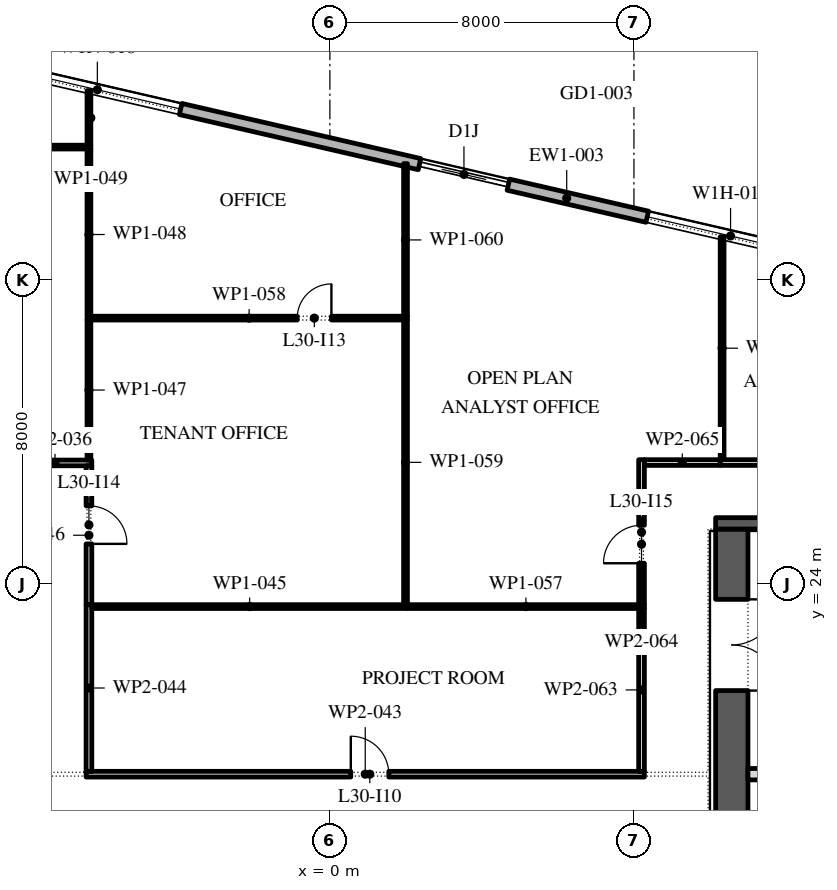
"""IFC4 building model, lengths in metres.
Left out: names, types, materials, properties, quantities, classifications, styles, units other than length and angle.
Written with IfcOpenShell. Run it as: python <this file> out.ifc"""

import sys

from ifc_helpers import new_model, si_unit, direction, frame, frame_2d, origin, place, context, subcontext, project, spatial, rectangle, extrude, element, fill, save


model = new_model("IFC4")
c1 = context("Model", 3, precision=1e-05, world=origin(), true_north=direction((0.0, 1.0)))
c2 = subcontext(c1, "Body", "Model", "MODEL_VIEW")
j1 = project(units=[si_unit("LENGTHUNIT", "METRE"), si_unit("PLANEANGLEUNIT", "RADIAN")], contexts=[c1])
p1 = place(None, origin())
s1 = spatial("IfcSite", under=j1, at=p1, CompositionType="ELEMENT")
p2 = place(p1, origin())
s2 = spatial("IfcBuilding", under=s1, at=p2, CompositionType="ELEMENT")
p3 = place(p2, frame((0.0, 0.0, 139.2)))
s3 = spatial("IfcBuildingStorey", under=s2, at=p3, CompositionType="ELEMENT", Elevation=139.2)
p4 = place(p3, frame((31.078, 28.421, 0.0), z_axis=(0.0, 0.0, 1.0), x_axis=(-0.974370456532, 0.224949357493, 0.0)))
e1 = element("IfcWall", 1, at=p4, inside=s3, PredefinedType="STANDARD", context=c2, shape_type="SweptSolid", body=[
    extrude(rectangle(XDim=51.0, YDim=0.3, at=frame_2d((25.5, 0.0))), origin(), (0.0, 0.0, 1.0), 4.0),
])
p5 = place(p4, frame((1.875, 0.0, 0.45)))
e2 = element("IfcOpeningElement", 2, at=p5, cuts=e1, PredefinedType="OPENING", context=c2, shape_type="SweptSolid", body=[
    extrude(rectangle(XDim=4.5, YDim=2.875, at=frame_2d((2.25, 1.438))), frame((0.0, 0.16, 0.0), z_axis=(0.0, -1.0, 0.0), x_axis=(1.0, 0.0, 0.0)), (0.0, 0.0, 1.0), 0.32),
])
p6 = place(p4, frame((10.275, 0.0, 0.45)))
e3 = element("IfcOpeningElement", 3, at=p6, cuts=e1, PredefinedType="OPENING", context=c2, shape_type="SweptSolid", body=[
    extrude(rectangle(XDim=4.5, YDim=2.825, at=frame_2d((2.25, 1.413))), frame((0.0, 0.16, 0.0), z_axis=(0.0, -1.0, 0.0), x_axis=(1.0, 0.0, 0.0)), (0.0, 0.0, 1.0), 0.32),
])
p7 = place(p4, frame((18.825, 0.0, 0.45)))
e4 = element("IfcOpeningElement", 4, at=p7, cuts=e1, PredefinedType="OPENING", context=c2, shape_type="SweptSolid", body=[
    extrude(rectangle(XDim=4.5, YDim=2.75, at=frame_2d((2.25, 1.375))), frame((0.0, 0.16, 0.0), z_axis=(0.0, -1.0, 0.0), x_axis=(1.0, 0.0, 0.0)), (0.0, 0.0, 1.0), 0.32),
])
p8 = place(p4, frame((27.075, 0.0, 0.0)))
e5 = element("IfcOpeningElement", 5, at=p8, cuts=e1, PredefinedType="OPENING", context=c2, shape_type="SweptSolid", body=[
    extrude(rectangle(XDim=2.4, YDim=3.125, at=frame_2d((1.2, 1.562))), frame((0.0, 0.16, 0.0), z_axis=(0.0, -1.0, 0.0), x_axis=(1.0, 0.0, 0.0)), (0.0, 0.0, 1.0), 0.32),
])
p9 = place(p4, frame((35.925, 0.0, 0.45)))
e6 = element("IfcOpeningElement", 6, at=p9, cuts=e1, PredefinedType="OPENING", context=c2, shape_type="SweptSolid", body=[
    extrude(rectangle(XDim=4.5, YDim=2.525, at=frame_2d((2.25, 1.262))), frame((0.0, 0.16, 0.0), z_axis=(0.0, -1.0, 0.0), x_axis=(1.0, 0.0, 0.0)), (0.0, 0.0, 1.0), 0.32),
])
p10 = place(p4, frame((44.475, 0.0, 0.45)))
e7 = element("IfcOpeningElement", 7, at=p10, cuts=e1, PredefinedType="OPENING", context=c2, shape_type="SweptSolid", body=[
    extrude(rectangle(XDim=4.5, YDim=2.45, at=frame_2d((2.25, 1.225))), frame((0.0, 0.16, 0.0), z_axis=(0.0, -1.0, 0.0), x_axis=(1.0, 0.0, 0.0)), (0.0, 0.0, 1.0), 0.32),
])
p11 = place(p3, frame((10.575, -2.45, 0.0), z_axis=(0.0, 0.0, 1.0), x_axis=(0.0, 1.0, 0.0)))
e8 = element("IfcWall", 8, at=p11, inside=s3, PredefinedType="SHEAR", context=c2, shape_type="SweptSolid", body=[
    extrude(rectangle(XDim=27.9, YDim=0.85, at=frame_2d((13.95, 0.0))), origin(), (0.0, 0.0, 1.0), 4.0),
])
p12 = place(p11, frame((23.65, 0.0, 0.0)))
e9 = element("IfcOpeningElement", 9, at=p12, cuts=e8, PredefinedType="OPENING", context=c2, shape_type="SweptSolid", body=[
    extrude(rectangle(XDim=2.4, YDim=2.1, at=frame_2d((1.2, 1.05))), frame((0.0, 0.435, 0.0), z_axis=(0.0, -1.0, 0.0), x_axis=(1.0, 0.0, 0.0)), (0.0, 0.0, 1.0), 0.87),
])
p13 = place(p11, frame((1.387, 0.0, 0.0)))
e10 = element("IfcOpeningElement", 10, at=p13, cuts=e8, PredefinedType="OPENING", context=c2, shape_type="SweptSolid", body=[
    extrude(rectangle(XDim=0.9, YDim=2.1, at=frame_2d((0.45, 1.05))), frame((0.0, 0.435, 0.0), z_axis=(0.0, -1.0, 0.0), x_axis=(1.0, 0.0, 0.0)), (0.0, 0.0, 1.0), 0.87),
])
p14 = place(p11, frame((4.562, 0.0, 0.0)))
e11 = element("IfcOpeningElement", 11, at=p14, cuts=e8, PredefinedType="OPENING", context=c2, shape_type="SweptSolid", body=[
    extrude(rectangle(XDim=1.0, YDim=2.1, at=frame_2d((0.5, 1.05))), frame((0.0, 0.435, 0.0), z_axis=(0.0, -1.0, 0.0), x_axis=(1.0, 0.0, 0.0)), (0.0, 0.0, 1.0), 0.87),
])
p15 = place(p3, frame((10.15, 25.6, 0.0), z_axis=(0.0, 0.0, 1.0), x_axis=(1.0, 0.0, 0.0)))
e12 = element("IfcWall", 12, at=p15, inside=s3, PredefinedType="SHEAR", context=c2, shape_type="SweptSolid", body=[
    extrude(rectangle(XDim=11.7, YDim=0.3, at=frame_2d((5.85, 0.0))), origin(), (0.0, 0.0, 1.0), 4.0),
])
p16 = place(p3, frame((11.0, 19.0, 0.0), z_axis=(0.0, 0.0, 1.0), x_axis=(1.0, 0.0, 0.0)))
e13 = element("IfcWall", 13, at=p16, inside=s3, PredefinedType="PARTITIONING", context=c2, shape_type="SweptSolid", body=[
    extrude(rectangle(XDim=3.0, YDim=0.3, at=frame_2d((1.5, 0.0))), origin(), (0.0, 0.0, 1.0), 4.0),
])
p17 = place(p3, frame((-14.62, 35.5, 0.0), z_axis=(0.0, 0.0, 1.0), x_axis=(1.0, 0.0, 0.0)))
e14 = element("IfcWall", 14, at=p17, inside=s3, PredefinedType="PARTITIONING", context=c2, shape_type="SweptSolid", body=[
    extrude(rectangle(XDim=8.33, YDim=0.1, at=frame_2d((4.165, 0.0))), origin(), (0.0, 0.0, 1.0), 4.0),
])
p18 = place(p17, frame((5.43, 0.0, 0.0)))
e15 = element("IfcOpeningElement", 15, at=p18, cuts=e14, PredefinedType="OPENING", context=c2, shape_type="SweptSolid", body=[
    extrude(rectangle(XDim=0.9, YDim=2.1, at=frame_2d((0.45, 1.05))), frame((0.0, 0.06, 0.0), z_axis=(0.0, -1.0, 0.0), x_axis=(1.0, 0.0, 0.0)), (0.0, 0.0, 1.0), 0.12),
])
p19 = place(p3, frame((-8.2, 27.19, 0.0), z_axis=(0.0, 0.0, 1.0), x_axis=(1.0, 0.0, 0.0)))
e16 = element("IfcWall", 16, at=p19, inside=s3, PredefinedType="PARTITIONING", context=c2, shape_type="SweptSolid", body=[
    extrude(rectangle(XDim=1.935, YDim=0.15, at=frame_2d((0.968, 0.0))), origin(), (0.0, 0.0, 1.0), 4.0),
])
p20 = place(p3, frame((-6.415, 19.0, 0.0), z_axis=(0.0, 0.0, 1.0), x_axis=(1.0, 0.0, 0.0)))
e17 = element("IfcWall", 17, at=p20, inside=s3, PredefinedType="PARTITIONING", context=c2, shape_type="SweptSolid", body=[
    extrude(rectangle(XDim=14.69, YDim=0.15, at=frame_2d((7.345, 0.0))), origin(), (0.0, 0.0, 1.0), 4.0),
])
p21 = place(p20, frame((6.965, 0.0, 0.0)))
e18 = element("IfcOpeningElement", 18, at=p21, cuts=e17, PredefinedType="OPENING", context=c2, shape_type="SweptSolid", body=[
    extrude(rectangle(XDim=1.0, YDim=2.1, at=frame_2d((0.5, 1.05))), frame((0.0, 0.085, 0.0), z_axis=(0.0, -1.0, 0.0), x_axis=(1.0, 0.0, 0.0)), (0.0, 0.0, 1.0), 0.17),
])
p22 = place(p3, frame((-6.34, 23.46, 0.0), z_axis=(0.0, 0.0, 1.0), x_axis=(0.0, -1.0, 0.0)))
e19 = element("IfcWall", 19, at=p22, inside=s3, PredefinedType="PARTITIONING", context=c2, shape_type="SweptSolid", body=[
    extrude(rectangle(XDim=4.385, YDim=0.15, at=frame_2d((2.192, 0.0))), origin(), (0.0, 0.0, 1.0), 4.0),
])
p23 = place(p3, frame((-6.265, 23.41, 0.0), z_axis=(0.0, 0.0, 1.0), x_axis=(1.0, 0.0, 0.0)))
e20 = element("IfcWall", 20, at=p23, inside=s3, PredefinedType="PARTITIONING", context=c2, shape_type="SweptSolid", body=[
    extrude(rectangle(XDim=8.305, YDim=0.1, at=frame_2d((4.152, 0.0))), origin(), (0.0, 0.0, 1.0), 4.0),
])
p24 = place(p3, frame((-6.34, 27.115, 0.0), z_axis=(0.0, 0.0, 1.0), x_axis=(0.0, -1.0, 0.0)))
e21 = element("IfcWall", 21, at=p24, inside=s3, PredefinedType="PARTITIONING", context=c2, shape_type="SweptSolid", body=[
    extrude(rectangle(XDim=3.655, YDim=0.15, at=frame_2d((1.828, 0.0))), origin(), (0.0, 0.0, 1.0), 4.0),
])
p25 = place(p24, frame((1.055, 0.0, 0.0)))
e22 = element("IfcOpeningElement", 22, at=p25, cuts=e21, PredefinedType="OPENING", context=c2, shape_type="SweptSolid", body=[
    extrude(rectangle(XDim=1.0, YDim=2.1, at=frame_2d((0.5, 1.05))), frame((0.0, 0.085, 0.0), z_axis=(0.0, -1.0, 0.0), x_axis=(1.0, 0.0, 0.0)), (0.0, 0.0, 1.0), 0.17),
])
p26 = place(p3, frame((-6.34, 27.265, 0.0), z_axis=(0.0, 0.0, 1.0), x_axis=(0.0, 1.0, 0.0)))
e23 = element("IfcWall", 23, at=p26, inside=s3, PredefinedType="PARTITIONING", context=c2, shape_type="SweptSolid", body=[
    extrude(rectangle(XDim=3.685, YDim=0.1, at=frame_2d((1.843, 0.0))), origin(), (0.0, 0.0, 1.0), 4.0),
])
p27 = place(p3, frame((-6.34, 30.95, 0.0), z_axis=(0.0, 0.0, 1.0), x_axis=(0.0, 1.0, 0.0)))
e24 = element("IfcWall", 24, at=p27, inside=s3, PredefinedType="PARTITIONING", context=c2, shape_type="SweptSolid", body=[
    extrude(rectangle(XDim=4.5, YDim=0.1, at=frame_2d((2.25, 0.0))), origin(), (0.0, 0.0, 1.0), 4.0),
])
p28 = place(p3, frame((-6.34, 35.55, 0.0), z_axis=(0.0, 0.0, 1.0), x_axis=(0.0, 1.0, 0.0)))
e25 = element("IfcWall", 25, at=p28, inside=s3, PredefinedType="PARTITIONING", context=c2, shape_type="SweptSolid", body=[
    extrude(rectangle(XDim=1.438, YDim=0.1, at=frame_2d((0.719, 0.0))), origin(), (0.0, 0.0, 1.0), 4.0),
])
p29 = place(p3, frame((2.04, 23.41, 0.0), z_axis=(0.0, 0.0, 1.0), x_axis=(1.0, 0.0, 0.0)))
e26 = element("IfcWall", 26, at=p29, inside=s3, PredefinedType="PARTITIONING", context=c2, shape_type="SweptSolid", body=[
    extrude(rectangle(XDim=6.235, YDim=0.1, at=frame_2d((3.117, 0.0))), origin(), (0.0, 0.0, 1.0), 4.0),
])
p30 = place(p3, frame((2.04, 31.0, 0.0), z_axis=(0.0, 0.0, 1.0), x_axis=(-1.0, 0.0, 0.0)))
e27 = element("IfcWall", 27, at=p30, inside=s3, PredefinedType="PARTITIONING", context=c2, shape_type="SweptSolid", body=[
    extrude(rectangle(XDim=8.33, YDim=0.1, at=frame_2d((4.165, 0.0))), origin(), (0.0, 0.0, 1.0), 4.0),
])
p31 = place(p30, frame((2.0, 0.0, 0.0)))
e28 = element("IfcOpeningElement", 28, at=p31, cuts=e27, PredefinedType="OPENING", context=c2, shape_type="SweptSolid", body=[
    extrude(rectangle(XDim=0.9, YDim=2.1, at=frame_2d((0.45, 1.05))), frame((0.0, 0.06, 0.0), z_axis=(0.0, -1.0, 0.0), x_axis=(1.0, 0.0, 0.0)), (0.0, 0.0, 1.0), 0.12),
])
p32 = place(p3, frame((1.99, 30.95, 0.0), z_axis=(0.0, 0.0, 1.0), x_axis=(0.0, -1.0, 0.0)))
e29 = element("IfcWall", 29, at=p32, inside=s3, PredefinedType="PARTITIONING", context=c2, shape_type="SweptSolid", body=[
    extrude(rectangle(XDim=7.49, YDim=0.1, at=frame_2d((3.745, 0.0))), origin(), (0.0, 0.0, 1.0), 4.0),
])
p33 = place(p3, frame((1.99, 35.065, 0.0), z_axis=(0.0, 0.0, 1.0), x_axis=(0.0, -1.0, 0.0)))
e30 = element("IfcWall", 30, at=p33, inside=s3, PredefinedType="PARTITIONING", context=c2, shape_type="SweptSolid", body=[
    extrude(rectangle(XDim=4.015, YDim=0.1, at=frame_2d((2.007, 0.0))), origin(), (0.0, 0.0, 1.0), 4.0),
])
p34 = place(p3, frame((8.2, 19.075, 0.0), z_axis=(0.0, 0.0, 1.0), x_axis=(0.0, 1.0, 0.0)))
e31 = element("IfcWall", 31, at=p34, inside=s3, PredefinedType="PARTITIONING", context=c2, shape_type="SweptSolid", body=[
    extrude(rectangle(XDim=4.285, YDim=0.15, at=frame_2d((2.143, 0.0))), origin(), (0.0, 0.0, 1.0), 4.0),
])
p35 = place(p3, frame((8.2, 23.46, 0.0), z_axis=(0.0, 0.0, 1.0), x_axis=(0.0, 1.0, 0.0)))
e32 = element("IfcWall", 32, at=p35, inside=s3, PredefinedType="PARTITIONING", context=c2, shape_type="SweptSolid", body=[
    extrude(rectangle(XDim=3.815, YDim=0.15, at=frame_2d((1.907, 0.0))), origin(), (0.0, 0.0, 1.0), 4.0),
])
p36 = place(p35, frame((1.09, 0.0, 0.0)))
e33 = element("IfcOpeningElement", 33, at=p36, cuts=e32, PredefinedType="OPENING", context=c2, shape_type="SweptSolid", body=[
    extrude(rectangle(XDim=1.0, YDim=2.1, at=frame_2d((0.5, 1.05))), frame((0.0, 0.085, 0.0), z_axis=(0.0, -1.0, 0.0), x_axis=(1.0, 0.0, 0.0)), (0.0, 0.0, 1.0), 0.17),
])
p37 = place(p3, frame((8.275, 27.2, 0.0), z_axis=(0.0, 0.0, 1.0), x_axis=(1.0, 0.0, 0.0)))
e34 = element("IfcWall", 34, at=p37, inside=s3, PredefinedType="PARTITIONING", context=c2, shape_type="SweptSolid", body=[
    extrude(rectangle(XDim=1.995, YDim=0.15, at=frame_2d((0.998, 0.0))), origin(), (0.0, 0.0, 1.0), 4.0),
])
p38 = place(p3, frame((10.27, 27.2, 0.0), z_axis=(0.0, 0.0, 1.0), x_axis=(1.0, 0.0, 0.0)))
e35 = element("IfcWall", 35, at=p38, inside=s3, PredefinedType="PARTITIONING", context=c2, shape_type="SweptSolid", body=[
    extrude(rectangle(XDim=12.79, YDim=0.15, at=frame_2d((6.395, 0.0))), origin(), (0.0, 0.0, 1.0), 4.0),
])
p39 = place(p38, frame((7.09, 0.0, 0.0)))
e36 = element("IfcOpeningElement", 36, at=p39, cuts=e35, PredefinedType="OPENING", context=c2, shape_type="SweptSolid", body=[
    extrude(rectangle(XDim=1.0, YDim=2.1, at=frame_2d((0.5, 1.05))), frame((0.0, 0.085, 0.0), z_axis=(0.0, -1.0, 0.0), x_axis=(1.0, 0.0, 0.0)), (0.0, 0.0, 1.0), 0.17),
])
p40 = place(p3, frame((10.32, 33.142, 0.0), z_axis=(0.0, 0.0, 1.0), x_axis=(0.0, -1.0, 0.0)))
e37 = element("IfcWall", 37, at=p40, inside=s3, PredefinedType="PARTITIONING", context=c2, shape_type="SweptSolid", body=[
    extrude(rectangle(XDim=5.867, YDim=0.1, at=frame_2d((2.934, 0.0))), origin(), (0.0, 0.0, 1.0), 4.0),
])
p41 = place(p7, origin())
e38 = element("IfcWindow", 38, at=p41, inside=s3, PartitioningType="DOUBLE_PANEL_VERTICAL", PredefinedType="WINDOW", context=c2, shape_type="SweptSolid", body=[
    extrude(rectangle(XDim=4.5, YDim=2.75, at=frame_2d((2.25, 1.375))), frame((0.0, 0.03, 0.0), z_axis=(0.0, -1.0, 0.0), x_axis=(1.0, 0.0, 0.0)), (0.0, 0.0, 1.0), 0.06),
])
fill(e4, e38)
p42 = place(p8, origin())
e39 = element("IfcDoor", 39, at=p42, inside=s3, OperationType="DOUBLE_DOOR_SLIDING", PredefinedType="DOOR", context=c2, shape_type="SweptSolid", body=[
    extrude(rectangle(XDim=2.4, YDim=3.125, at=frame_2d((1.2, 1.562))), frame((0.0, 0.025, 0.0), z_axis=(0.0, -1.0, 0.0), x_axis=(1.0, 0.0, 0.0)), (0.0, 0.0, 1.0), 0.05),
])
fill(e5, e39)
p43 = place(p9, origin())
e40 = element("IfcWindow", 40, at=p43, inside=s3, PartitioningType="DOUBLE_PANEL_VERTICAL", PredefinedType="WINDOW", context=c2, shape_type="SweptSolid", body=[
    extrude(rectangle(XDim=4.5, YDim=2.525, at=frame_2d((2.25, 1.262))), frame((0.0, 0.03, 0.0), z_axis=(0.0, -1.0, 0.0), x_axis=(1.0, 0.0, 0.0)), (0.0, 0.0, 1.0), 0.06),
])
fill(e6, e40)
p44 = place(p12, frame((2.4, 0.0, 0.0), z_axis=(0.0, 0.0, 1.0), x_axis=(-1.0, 0.0, 0.0)))
e41 = element("IfcDoor", 41, at=p44, inside=s3, OperationType="DOUBLE_DOOR_SINGLE_SWING", PredefinedType="DOOR", context=c2, shape_type="SweptSolid", body=[
    extrude(rectangle(XDim=2.4, YDim=2.1, at=frame_2d((1.2, 1.05))), frame((0.0, 0.025, 0.0), z_axis=(0.0, -1.0, 0.0), x_axis=(1.0, 0.0, 0.0)), (0.0, 0.0, 1.0), 0.05),
])
fill(e9, e41)
p45 = place(p21, origin())
e42 = element("IfcDoor", 42, at=p45, inside=s3, OperationType="SINGLE_SWING_RIGHT", PredefinedType="DOOR", context=c2, shape_type="SweptSolid", body=[
    extrude(rectangle(XDim=1.0, YDim=2.1, at=frame_2d((0.5, 1.05))), frame((0.0, 0.025, 0.0), z_axis=(0.0, -1.0, 0.0), x_axis=(1.0, 0.0, 0.0)), (0.0, 0.0, 1.0), 0.05),
])
fill(e18, e42)
p46 = place(p31, frame((0.9, 0.0, 0.0), z_axis=(0.0, 0.0, 1.0), x_axis=(-1.0, 0.0, 0.0)))
e43 = element("IfcDoor", 43, at=p46, inside=s3, OperationType="SINGLE_SWING_LEFT", PredefinedType="DOOR", context=c2, shape_type="SweptSolid", body=[
    extrude(rectangle(XDim=0.9, YDim=2.1, at=frame_2d((0.45, 1.05))), frame((0.0, 0.025, 0.0), z_axis=(0.0, -1.0, 0.0), x_axis=(1.0, 0.0, 0.0)), (0.0, 0.0, 1.0), 0.05),
])
fill(e28, e43)
p47 = place(p25, origin())
e44 = element("IfcDoor", 44, at=p47, inside=s3, OperationType="SINGLE_SWING_LEFT", PredefinedType="DOOR", context=c2, shape_type="SweptSolid", body=[
    extrude(rectangle(XDim=1.0, YDim=2.1, at=frame_2d((0.5, 1.05))), frame((0.0, 0.025, 0.0), z_axis=(0.0, -1.0, 0.0), x_axis=(1.0, 0.0, 0.0)), (0.0, 0.0, 1.0), 0.05),
])
fill(e22, e44)
p48 = place(p36, origin())
e45 = element("IfcDoor", 45, at=p48, inside=s3, OperationType="SINGLE_SWING_RIGHT", PredefinedType="DOOR", context=c2, shape_type="SweptSolid", body=[
    extrude(rectangle(XDim=1.0, YDim=2.1, at=frame_2d((0.5, 1.05))), frame((0.0, 0.025, 0.0), z_axis=(0.0, -1.0, 0.0), x_axis=(1.0, 0.0, 0.0)), (0.0, 0.0, 1.0), 0.05),
])
fill(e33, e45)
save(model, sys.argv[1])
